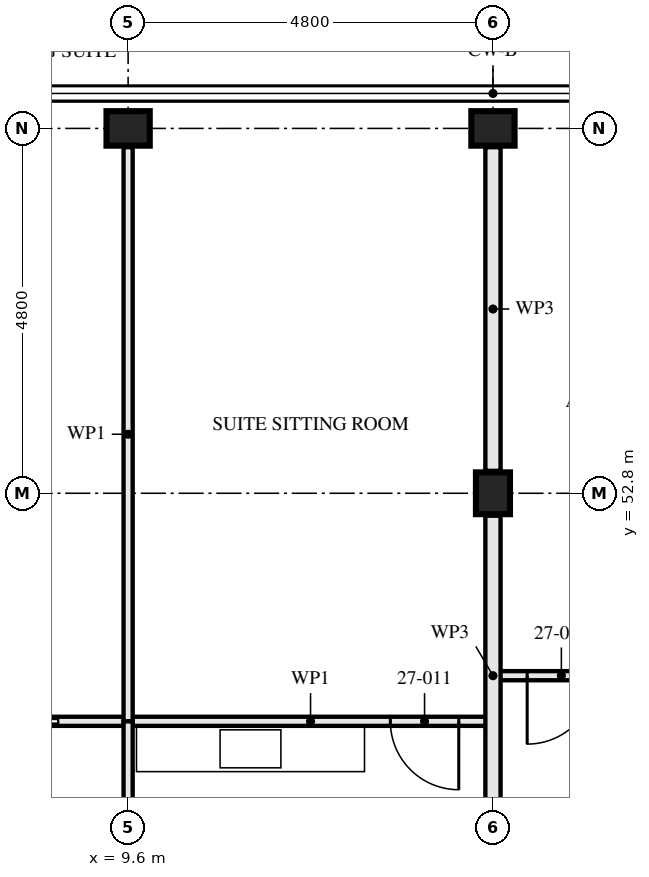
"""IFC4 building model, lengths in metres.
Left out: names, types, materials, properties, quantities, classifications, styles, units other than length and angle.
Written with IfcOpenShell. Run it as: python <this file> out.ifc"""

import sys

from ifc_helpers import new_model, si_unit, direction, frame, frame_2d, origin, origin_2d, place, context, subcontext, project, spatial, rectangle, i_section, extrude, element, fill, save


model = new_model("IFC4")
c1 = context("Model", 3, precision=1e-05, world=origin(), true_north=direction((0.0, 1.0)))
c2 = subcontext(c1, "Body", "Model", "MODEL_VIEW")
j1 = project(units=[si_unit("LENGTHUNIT", "METRE"), si_unit("PLANEANGLEUNIT", "RADIAN")], contexts=[c1])
p1 = place(None, origin())
s1 = spatial("IfcSite", under=j1, at=p1, CompositionType="ELEMENT")
p2 = place(p1, origin())
s2 = spatial("IfcBuilding", under=s1, at=p2, CompositionType="ELEMENT")
p3 = place(p2, frame((0.0, 0.0, 101.5)))
s3 = spatial("IfcBuildingStorey", under=s2, at=p3, CompositionType="ELEMENT", Elevation=101.5)
p4 = place(p3, frame((9.6, 57.6, 0.0), z_axis=(0.0, 0.0, 1.0), x_axis=(0.0, 1.0, 0.0)))
e1 = element("IfcColumn", 1, at=p4, inside=s3, PredefinedType="COLUMN", context=c2, shape_type="SweptSolid", body=[
    extrude(i_section(OverallWidth=0.454, OverallDepth=0.569, WebThickness=0.078, FlangeThickness=0.125, FilletRadius=0.015, at=origin_2d()), origin(), (0.0, 0.0, 1.0), 3.5),
])
p5 = place(p3, frame((14.4, 52.8, 0.0), z_axis=(0.0, 0.0, 1.0), x_axis=(1.0, 0.0, 0.0)))
e2 = element("IfcColumn", 2, at=p5, inside=s3, PredefinedType="COLUMN", context=c2, shape_type="SweptSolid", body=[
    extrude(i_section(OverallWidth=0.448, OverallDepth=0.55, WebThickness=0.072, FlangeThickness=0.115, FilletRadius=0.015, at=origin_2d()), origin(), (0.0, 0.0, 1.0), 3.5),
])
p6 = place(p3, frame((14.4, 57.6, 0.0), z_axis=(0.0, 0.0, 1.0), x_axis=(0.0, 1.0, 0.0)))
e3 = element("IfcColumn", 3, at=p6, inside=s3, PredefinedType="COLUMN", context=c2, shape_type="SweptSolid", body=[
    extrude(i_section(OverallWidth=0.454, OverallDepth=0.569, WebThickness=0.078, FlangeThickness=0.125, FilletRadius=0.015, at=origin_2d()), origin(), (0.0, 0.0, 1.0), 3.5),
])
p7 = place(p3, frame((9.6, 49.8, 0.0), z_axis=(0.0, 0.0, 1.0), x_axis=(0.0, -1.0, 0.0)))
e4 = element("IfcWall", 4, at=p7, inside=s3, PredefinedType="PARTITIONING", context=c2, shape_type="SweptSolid", body=[
    extrude(rectangle(XDim=4.65, YDim=0.12, at=frame_2d((2.325, 0.0))), origin(), (0.0, 0.0, 1.0), 2.55),
])
p8 = place(p7, frame((3.35, 0.0, 0.0)))
e5 = element("IfcOpeningElement", 5, at=p8, cuts=e4, PredefinedType="OPENING", context=c2, shape_type="SweptSolid", body=[
    extrude(rectangle(XDim=0.9, YDim=2.1, at=frame_2d((0.45, 1.05))), frame((0.0, 0.071, 0.0), z_axis=(0.0, -1.0, 0.0), x_axis=(1.0, 0.0, 0.0)), (0.0, 0.0, 1.0), 0.141),
])
p9 = place(p3, frame((14.4, 49.8, 0.0), z_axis=(0.0, 0.0, 1.0), x_axis=(-1.0, 0.0, 0.0)))
e6 = element("IfcWall", 6, at=p9, inside=s3, PredefinedType="PARTITIONING", context=c2, shape_type="SweptSolid", body=[
    extrude(rectangle(XDim=4.8, YDim=0.12, at=frame_2d((2.4, 0.0))), origin(), (0.0, 0.0, 1.0), 3.33),
])
p10 = place(p9, frame((0.45, 0.0, 0.0)))
e7 = element("IfcOpeningElement", 7, at=p10, cuts=e6, PredefinedType="OPENING", context=c2, shape_type="SweptSolid", body=[
    extrude(rectangle(XDim=0.9, YDim=2.1, at=frame_2d((0.45, 1.05))), frame((0.0, 0.071, 0.0), z_axis=(0.0, -1.0, 0.0), x_axis=(1.0, 0.0, 0.0)), (0.0, 0.0, 1.0), 0.141),
])
p11 = place(p3, frame((9.6, 49.8, 0.0), z_axis=(0.0, 0.0, 1.0), x_axis=(-1.0, 0.0, 0.0)))
e8 = element("IfcWall", 8, at=p11, inside=s3, PredefinedType="PARTITIONING", context=c2, shape_type="SweptSolid", body=[
    extrude(rectangle(XDim=4.8, YDim=0.12, at=frame_2d((2.4, 0.0))), origin(), (0.0, 0.0, 1.0), 3.33),
])
p12 = place(p11, frame((3.45, 0.0, 0.0)))
e9 = element("IfcOpeningElement", 9, at=p12, cuts=e8, PredefinedType="OPENING", context=c2, shape_type="SweptSolid", body=[
    extrude(rectangle(XDim=0.9, YDim=2.1, at=frame_2d((0.45, 1.05))), frame((0.0, 0.071, 0.0), z_axis=(0.0, -1.0, 0.0), x_axis=(1.0, 0.0, 0.0)), (0.0, 0.0, 1.0), 0.141),
])
p13 = place(p11, frame((0.925, 0.0, 0.0)))
e10 = element("IfcOpeningElement", 10, at=p13, cuts=e8, PredefinedType="OPENING", context=c2, shape_type="SweptSolid", body=[
    extrude(rectangle(XDim=0.95, YDim=2.1, at=frame_2d((0.475, 1.05))), frame((0.0, 0.071, 0.0), z_axis=(0.0, -1.0, 0.0), x_axis=(1.0, 0.0, 0.0)), (0.0, 0.0, 1.0), 0.141),
])
p14 = place(p3, frame((9.6, 57.353, 0.0), z_axis=(0.0, 0.0, 1.0), x_axis=(0.0, -1.0, 0.0)))
e11 = element("IfcWall", 11, at=p14, inside=s3, PredefinedType="PARTITIONING", context=c2, shape_type="SweptSolid", body=[
    extrude(rectangle(XDim=7.553, YDim=0.12, at=frame_2d((3.776, 0.0))), origin(), (0.0, 0.0, 1.0), 2.55),
])
p15 = place(p3, frame((19.2, 50.4, 0.0), z_axis=(0.0, 0.0, 1.0), x_axis=(-1.0, 0.0, 0.0)))
e12 = element("IfcWall", 12, at=p15, inside=s3, PredefinedType="PARTITIONING", context=c2, shape_type="SweptSolid", body=[
    extrude(rectangle(XDim=4.8, YDim=0.12, at=frame_2d((2.4, 0.0))), origin(), (0.0, 0.0, 1.0), 3.33),
])
p16 = place(p15, frame((3.45, 0.0, 0.0)))
e13 = element("IfcOpeningElement", 13, at=p16, cuts=e12, PredefinedType="OPENING", context=c2, shape_type="SweptSolid", body=[
    extrude(rectangle(XDim=0.9, YDim=2.1, at=frame_2d((0.45, 1.05))), frame((0.0, 0.071, 0.0), z_axis=(0.0, -1.0, 0.0), x_axis=(1.0, 0.0, 0.0)), (0.0, 0.0, 1.0), 0.141),
])
p17 = place(p15, frame((0.925, 0.0, 0.0)))
e14 = element("IfcOpeningElement", 14, at=p17, cuts=e12, PredefinedType="OPENING", context=c2, shape_type="SweptSolid", body=[
    extrude(rectangle(XDim=0.95, YDim=2.1, at=frame_2d((0.475, 1.05))), frame((0.0, 0.071, 0.0), z_axis=(0.0, -1.0, 0.0), x_axis=(1.0, 0.0, 0.0)), (0.0, 0.0, 1.0), 0.141),
])
p18 = place(p3, frame((14.4, 48.295, 0.0), z_axis=(0.0, 0.0, 1.0), x_axis=(0.0, 1.0, 0.0)))
e15 = element("IfcWall", 15, at=p18, inside=s3, PredefinedType="PARTITIONING", context=c2, shape_type="SweptSolid", body=[
    extrude(rectangle(XDim=4.21, YDim=0.2, at=frame_2d((2.105, 0.0))), origin(), (0.0, 0.0, 1.0), 2.32),
])
p19 = place(p3, frame((14.4, 53.095, 0.0), z_axis=(0.0, 0.0, 1.0), x_axis=(0.0, 1.0, 0.0)))
e16 = element("IfcWall", 16, at=p19, inside=s3, PredefinedType="PARTITIONING", context=c2, shape_type="SweptSolid", body=[
    extrude(rectangle(XDim=4.258, YDim=0.2, at=frame_2d((2.129, 0.0))), origin(), (0.0, 0.0, 1.0), 2.32),
])
p20 = place(p10, origin())
e17 = element("IfcDoor", 17, at=p20, inside=s3, OperationType="SINGLE_SWING_RIGHT", PredefinedType="DOOR", context=c2, shape_type="SweptSolid", body=[
    extrude(rectangle(XDim=0.9, YDim=2.1, at=frame_2d((0.45, 1.05))), frame((0.0, 0.022, 0.0), z_axis=(0.0, -1.0, 0.0), x_axis=(1.0, 0.0, 0.0)), (0.0, 0.0, 1.0), 0.044),
])
fill(e7, e17)
p21 = place(p13, origin())
e18 = element("IfcDoor", 18, at=p21, inside=s3, OperationType="SLIDING_TO_LEFT", PredefinedType="DOOR", context=c2, shape_type="SweptSolid", body=[
    extrude(rectangle(XDim=0.95, YDim=2.1, at=frame_2d((0.475, 1.05))), frame((0.0, 0.022, 0.0), z_axis=(0.0, -1.0, 0.0), x_axis=(1.0, 0.0, 0.0)), (0.0, 0.0, 1.0), 0.044),
])
fill(e10, e18)
p22 = place(p16, origin())
e19 = element("IfcDoor", 19, at=p22, inside=s3, OperationType="SINGLE_SWING_LEFT", PredefinedType="DOOR", context=c2, shape_type="SweptSolid", body=[
    extrude(rectangle(XDim=0.9, YDim=2.1, at=frame_2d((0.45, 1.05))), frame((0.0, 0.022, 0.0), z_axis=(0.0, -1.0, 0.0), x_axis=(1.0, 0.0, 0.0)), (0.0, 0.0, 1.0), 0.044),
])
fill(e13, e19)
save(model, sys.argv[1])
